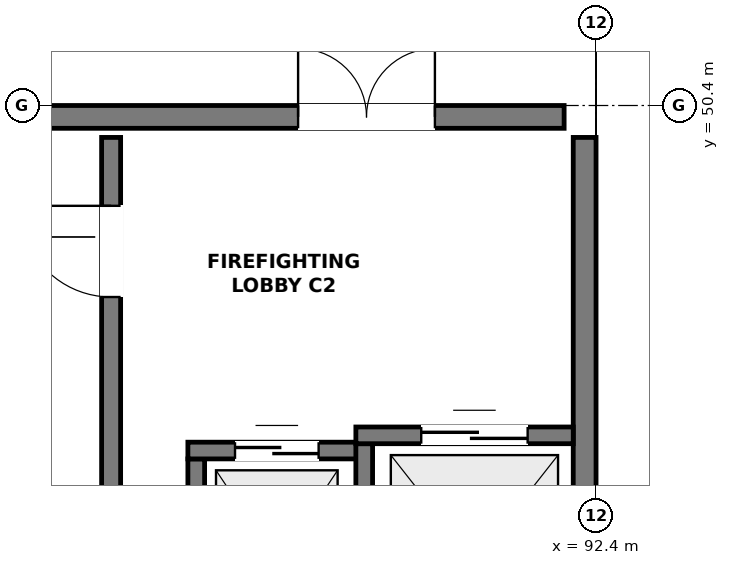
"""IFC4 building model, lengths in metres.
Left out: names, types, materials, properties, quantities, classifications, styles, units other than length and angle.
Written with IfcOpenShell. Run it as: python <this file> out.ifc"""

import sys

from ifc_helpers import new_model, si_unit, direction, frame, frame_2d, origin, place, context, subcontext, project, spatial, rectangle, extrude, element, fill, save


model = new_model("IFC4")
c1 = context("Model", 3, precision=1e-05, world=origin(), true_north=direction((0.0, 1.0)))
c2 = subcontext(c1, "Body", "Model", "MODEL_VIEW")
j1 = project(units=[si_unit("LENGTHUNIT", "METRE"), si_unit("PLANEANGLEUNIT", "RADIAN")], contexts=[c1])
p1 = place(None, origin())
s1 = spatial("IfcSite", under=j1, at=p1, CompositionType="ELEMENT")
p2 = place(p1, origin())
s2 = spatial("IfcBuilding", under=s1, at=p2, CompositionType="ELEMENT")
p3 = place(p2, frame((0.0, 0.0, -4.8)))
s3 = spatial("IfcBuildingStorey", under=s2, at=p3, CompositionType="ELEMENT", Elevation=-4.8)
p4 = place(p3, frame((76.02, 50.25, 0.0), z_axis=(0.0, 0.0, 1.0), x_axis=(1.0, 0.0, 0.0)))
e1 = element("IfcWall", 1, at=p4, inside=s3, PredefinedType="SHEAR", context=c2, shape_type="SweptSolid", body=[
    extrude(rectangle(XDim=15.96, YDim=0.3, at=frame_2d((7.98, 0.0))), origin(), (0.0, 0.0, 1.0), 4.5),
])
p5 = place(p4, frame((12.46, 0.0, 0.0)))
e2 = element("IfcOpeningElement", 2, at=p5, cuts=e1, PredefinedType="OPENING", context=c2, shape_type="SweptSolid", body=[
    extrude(rectangle(XDim=1.8, YDim=2.2, at=frame_2d((0.9, 1.1))), frame((0.0, 0.162, 0.0), z_axis=(0.0, -1.0, 0.0), x_axis=(1.0, 0.0, 0.0)), (0.0, 0.0, 1.0), 0.324),
])
p6 = place(p3, frame((92.25, 42.42, 0.0), z_axis=(0.0, 0.0, 1.0), x_axis=(0.0, 1.0, 0.0)))
e3 = element("IfcWall", 3, at=p6, inside=s3, PredefinedType="SHEAR", context=c2, shape_type="SweptSolid", body=[
    extrude(rectangle(XDim=7.56, YDim=0.3, at=frame_2d((3.78, 0.0))), origin(), (0.0, 0.0, 1.0), 4.5),
])
p7 = place(p3, frame((86.02, 42.42, 0.0), z_axis=(0.0, 0.0, 1.0), x_axis=(0.0, 1.0, 0.0)))
e4 = element("IfcWall", 4, at=p7, inside=s3, PredefinedType="SHEAR", context=c2, shape_type="SweptSolid", body=[
    extrude(rectangle(XDim=7.56, YDim=0.25, at=frame_2d((3.78, 0.0))), origin(), (0.0, 0.0, 1.0), 4.5),
])
p8 = place(p7, frame((5.46, 0.0, 0.0)))
e5 = element("IfcOpeningElement", 5, at=p8, cuts=e4, PredefinedType="OPENING", context=c2, shape_type="SweptSolid", body=[
    extrude(rectangle(XDim=1.2, YDim=2.2, at=frame_2d((0.6, 1.1))), frame((0.0, 0.137, 0.0), z_axis=(0.0, -1.0, 0.0), x_axis=(1.0, 0.0, 0.0)), (0.0, 0.0, 1.0), 0.274),
])
p9 = place(p3, frame((87.14, 43.05, 0.0), z_axis=(0.0, 0.0, 1.0), x_axis=(0.0, 1.0, 0.0)))
e6 = element("IfcWall", 6, at=p9, inside=s3, PredefinedType="SOLIDWALL", context=c2, shape_type="SweptSolid", body=[
    extrude(rectangle(XDim=2.7, YDim=0.22, at=frame_2d((1.35, 0.0))), origin(), (0.0, 0.0, 1.0), 4.5),
])
p10 = place(p3, frame((87.03, 45.86, 0.0), z_axis=(0.0, 0.0, 1.0), x_axis=(1.0, 0.0, 0.0)))
e7 = element("IfcWall", 7, at=p10, inside=s3, PredefinedType="SOLIDWALL", context=c2, shape_type="SweptSolid", body=[
    extrude(rectangle(XDim=2.43, YDim=0.22, at=frame_2d((1.215, 0.0))), origin(), (0.0, 0.0, 1.0), 4.5),
])
p11 = place(p10, frame((0.62, 0.0, 0.0)))
e8 = element("IfcOpeningElement", 8, at=p11, cuts=e7, PredefinedType="OPENING", context=c2, shape_type="SweptSolid", body=[
    extrude(rectangle(XDim=1.1, YDim=2.15, at=frame_2d((0.55, 1.075))), frame((0.0, 0.122, 0.0), z_axis=(0.0, -1.0, 0.0), x_axis=(1.0, 0.0, 0.0)), (0.0, 0.0, 1.0), 0.244),
])
p12 = place(p3, frame((89.35, 42.85, 0.0), z_axis=(0.0, 0.0, 1.0), x_axis=(0.0, 1.0, 0.0)))
e9 = element("IfcWall", 9, at=p12, inside=s3, PredefinedType="SOLIDWALL", context=c2, shape_type="SweptSolid", body=[
    extrude(rectangle(XDim=3.1, YDim=0.22, at=frame_2d((1.55, 0.0))), origin(), (0.0, 0.0, 1.0), 4.5),
])
p13 = place(p3, frame((89.24, 46.06, 0.0), z_axis=(0.0, 0.0, 1.0), x_axis=(1.0, 0.0, 0.0)))
e10 = element("IfcWall", 10, at=p13, inside=s3, PredefinedType="SOLIDWALL", context=c2, shape_type="SweptSolid", body=[
    extrude(rectangle(XDim=2.86, YDim=0.22, at=frame_2d((1.43, 0.0))), origin(), (0.0, 0.0, 1.0), 4.5),
])
p14 = place(p13, frame((0.86, 0.0, 0.0)))
e11 = element("IfcOpeningElement", 11, at=p14, cuts=e10, PredefinedType="OPENING", context=c2, shape_type="SweptSolid", body=[
    extrude(rectangle(XDim=1.4, YDim=2.2, at=frame_2d((0.7, 1.1))), frame((0.0, 0.122, 0.0), z_axis=(0.0, -1.0, 0.0), x_axis=(1.0, 0.0, 0.0)), (0.0, 0.0, 1.0), 0.244),
])
p15 = place(p5, origin())
e12 = element("IfcDoor", 12, at=p15, inside=s3, OperationType="DOUBLE_DOOR_SINGLE_SWING", PredefinedType="DOOR", context=c2, shape_type="SweptSolid", body=[
    extrude(rectangle(XDim=1.8, YDim=2.2, at=frame_2d((0.9, 1.1))), frame((0.0, 0.025, 0.0), z_axis=(0.0, -1.0, 0.0), x_axis=(1.0, 0.0, 0.0)), (0.0, 0.0, 1.0), 0.05),
])
fill(e2, e12)
p16 = place(p8, origin())
e13 = element("IfcDoor", 13, at=p16, inside=s3, OperationType="SINGLE_SWING_RIGHT", PredefinedType="DOOR", context=c2, shape_type="SweptSolid", body=[
    extrude(rectangle(XDim=1.2, YDim=2.2, at=frame_2d((0.6, 1.1))), frame((0.0, 0.025, 0.0), z_axis=(0.0, -1.0, 0.0), x_axis=(1.0, 0.0, 0.0)), (0.0, 0.0, 1.0), 0.05),
])
fill(e5, e13)
p17 = place(p11, origin())
e14 = element("IfcDoor", 14, at=p17, inside=s3, OperationType="DOUBLE_DOOR_SLIDING", PredefinedType="DOOR", context=c2, shape_type="SweptSolid", body=[
    extrude(rectangle(XDim=1.1, YDim=2.15, at=frame_2d((0.55, 1.075))), frame((0.0, 0.025, 0.0), z_axis=(0.0, -1.0, 0.0), x_axis=(1.0, 0.0, 0.0)), (0.0, 0.0, 1.0), 0.05),
])
fill(e8, e14)
p18 = place(p14, origin())
e15 = element("IfcDoor", 15, at=p18, inside=s3, OperationType="DOUBLE_DOOR_SLIDING", PredefinedType="DOOR", context=c2, shape_type="SweptSolid", body=[
    extrude(rectangle(XDim=1.4, YDim=2.2, at=frame_2d((0.7, 1.1))), frame((0.0, 0.025, 0.0), z_axis=(0.0, -1.0, 0.0), x_axis=(1.0, 0.0, 0.0)), (0.0, 0.0, 1.0), 0.05),
])
fill(e11, e15)
save(model, sys.argv[1])
